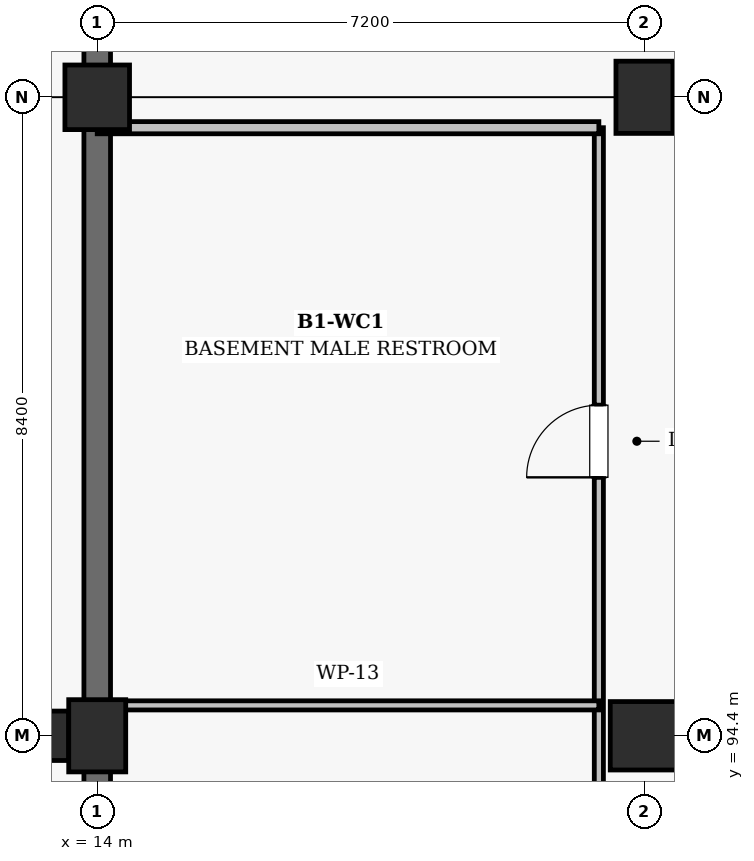
"""IFC4 building model, lengths in metres.
Left out: names, types, materials, properties, quantities, classifications, styles, units other than length and angle.
Written with IfcOpenShell. Run it as: python <this file> out.ifc"""

import sys

from ifc_helpers import new_model, si_unit, direction, frame, frame_2d, origin, origin_2d, place, context, subcontext, project, spatial, rectangle, extrude, element, fill, save


model = new_model("IFC4")
c1 = context("Model", 3, precision=1e-05, world=origin(), true_north=direction((0.0, 1.0)))
c2 = subcontext(c1, "Body", "Model", "MODEL_VIEW")
j1 = project(units=[si_unit("LENGTHUNIT", "METRE"), si_unit("PLANEANGLEUNIT", "RADIAN")], contexts=[c1])
p1 = place(None, origin())
s1 = spatial("IfcSite", under=j1, at=p1, CompositionType="ELEMENT")
p2 = place(p1, origin())
s2 = spatial("IfcBuilding", under=s1, at=p2, CompositionType="ELEMENT")
p3 = place(p2, frame((0.0, 0.0, -4.5)))
s3 = spatial("IfcBuildingStorey", under=s2, at=p3, CompositionType="ELEMENT", Elevation=-4.5)
p4 = place(p3, frame((14.0, 94.4, 0.0), z_axis=(0.0, 0.0, 1.0), x_axis=(1.0, 0.0, 0.0)))
e1 = element("IfcColumn", 1, at=p4, inside=s3, PredefinedType="COLUMN", context=c2, shape_type="SweptSolid", body=[
    extrude(rectangle(XDim=0.75, YDim=0.95, at=origin_2d()), origin(), (0.0, 0.0, 1.0), 4.5),
])
p5 = place(p3, frame((14.0, 102.8, 0.0), z_axis=(0.0, 0.0, 1.0), x_axis=(1.0, 0.0, 0.0)))
e2 = element("IfcColumn", 2, at=p5, inside=s3, PredefinedType="COLUMN", context=c2, shape_type="SweptSolid", body=[
    extrude(rectangle(XDim=0.85, YDim=0.85, at=origin_2d()), origin(), (0.0, 0.0, 1.0), 4.5),
])
p6 = place(p3, frame((21.2, 94.4, 0.0), z_axis=(0.0, 0.0, 1.0), x_axis=(1.0, 0.0, 0.0)))
e3 = element("IfcColumn", 3, at=p6, inside=s3, PredefinedType="COLUMN", context=c2, shape_type="SweptSolid", body=[
    extrude(rectangle(XDim=0.9, YDim=0.9, at=origin_2d()), origin(), (0.0, 0.0, 1.0), 4.5),
])
p7 = place(p3, frame((21.2, 102.8, 0.0), z_axis=(0.0, 0.0, 1.0), x_axis=(1.0, 0.0, 0.0)))
e4 = element("IfcColumn", 4, at=p7, inside=s3, PredefinedType="COLUMN", context=c2, shape_type="SweptSolid", body=[
    extrude(rectangle(XDim=0.75, YDim=0.95, at=origin_2d()), origin(), (0.0, 0.0, 1.0), 4.5),
])
p8 = place(p3, frame((13.147, 94.4, 0.0), z_axis=(0.0, 0.0, 1.0), x_axis=(0.0, 1.0, 0.0)))
e5 = element("IfcColumn", 5, at=p8, inside=s3, PredefinedType="COLUMN", context=c2, shape_type="SweptSolid", body=[
    extrude(rectangle(XDim=0.65, YDim=0.95, at=origin_2d()), origin(), (0.0, 0.0, 1.0), 4.5),
])
p9 = place(p3, frame((14.0, 14.0, 0.0), z_axis=(0.0, 0.0, 1.0), x_axis=(0.0, 1.0, 0.0)))
e6 = element("IfcWall", 6, at=p9, inside=s3, PredefinedType="USERDEFINED", context=c2, shape_type="SweptSolid", body=[
    extrude(rectangle(XDim=114.0, YDim=0.35, at=frame_2d((57.0, 0.0))), origin(), (0.0, 0.0, 1.0), 4.16),
])
p10 = place(p3, frame((20.6, 64.8, 0.0), z_axis=(0.0, 0.0, 1.0), x_axis=(0.0, 1.0, 0.0)))
e7 = element("IfcWall", 7, at=p10, inside=s3, PredefinedType="PARTITIONING", context=c2, shape_type="SweptSolid", body=[
    extrude(rectangle(XDim=37.6, YDim=0.12, at=frame_2d((18.8, 0.0))), origin(), (0.0, 0.0, 1.0), 3.36),
])
p11 = place(p10, frame((33.0, 0.0, 0.0)))
e8 = element("IfcOpeningElement", 8, at=p11, cuts=e7, PredefinedType="OPENING", context=c2, shape_type="SweptSolid", body=[
    extrude(rectangle(XDim=0.95, YDim=2.15, at=frame_2d((0.475, 1.075))), frame((0.0, 0.07, 0.0), z_axis=(0.0, -1.0, 0.0), x_axis=(1.0, 0.0, 0.0)), (0.0, 0.0, 1.0), 0.14),
])
p12 = place(p10, frame((25.4, 0.0, 0.0)))
e9 = element("IfcOpeningElement", 9, at=p12, cuts=e7, PredefinedType="OPENING", context=c2, shape_type="SweptSolid", body=[
    extrude(rectangle(XDim=0.95, YDim=2.15, at=frame_2d((0.475, 1.075))), frame((0.0, 0.07, 0.0), z_axis=(0.0, -1.0, 0.0), x_axis=(1.0, 0.0, 0.0)), (0.0, 0.0, 1.0), 0.14),
])
p13 = place(p10, frame((18.25, 0.0, 0.0)))
e10 = element("IfcOpeningElement", 10, at=p13, cuts=e7, PredefinedType="OPENING", context=c2, shape_type="SweptSolid", body=[
    extrude(rectangle(XDim=1.05, YDim=2.15, at=frame_2d((0.525, 1.075))), frame((0.0, 0.07, 0.0), z_axis=(0.0, -1.0, 0.0), x_axis=(1.0, 0.0, 0.0)), (0.0, 0.0, 1.0), 0.14),
])
p14 = place(p10, frame((2.55, 0.0, 0.0)))
e11 = element("IfcOpeningElement", 11, at=p14, cuts=e7, PredefinedType="OPENING", context=c2, shape_type="SweptSolid", body=[
    extrude(rectangle(XDim=1.9, YDim=2.3, at=frame_2d((0.95, 1.15))), frame((0.0, 0.07, 0.0), z_axis=(0.0, -1.0, 0.0), x_axis=(1.0, 0.0, 0.0)), (0.0, 0.0, 1.0), 0.14),
])
p15 = place(p3, frame((14.0, 102.4, 0.0), z_axis=(0.0, 0.0, 1.0), x_axis=(1.0, 0.0, 0.0)))
e12 = element("IfcWall", 12, at=p15, inside=s3, PredefinedType="PARTITIONING", context=c2, shape_type="SweptSolid", body=[
    extrude(rectangle(XDim=6.6, YDim=0.16, at=frame_2d((3.3, 0.0))), origin(), (0.0, 0.0, 1.0), 3.56),
])
p16 = place(p3, frame((14.0, 94.8, 0.0), z_axis=(0.0, 0.0, 1.0), x_axis=(1.0, 0.0, 0.0)))
e13 = element("IfcWall", 13, at=p16, inside=s3, PredefinedType="PARTITIONING", context=c2, shape_type="SweptSolid", body=[
    extrude(rectangle(XDim=6.6, YDim=0.12, at=frame_2d((3.3, 0.0))), origin(), (0.0, 0.0, 1.0), 3.56),
])
p17 = place(p11, origin())
e14 = element("IfcDoor", 14, at=p17, inside=s3, OperationType="SINGLE_SWING_LEFT", PredefinedType="DOOR", context=c2, shape_type="SweptSolid", body=[
    extrude(rectangle(XDim=0.95, YDim=2.15, at=frame_2d((0.475, 1.075))), frame((0.0, 0.025, 0.0), z_axis=(0.0, -1.0, 0.0), x_axis=(1.0, 0.0, 0.0)), (0.0, 0.0, 1.0), 0.05),
])
fill(e8, e14)
save(model, sys.argv[1])
